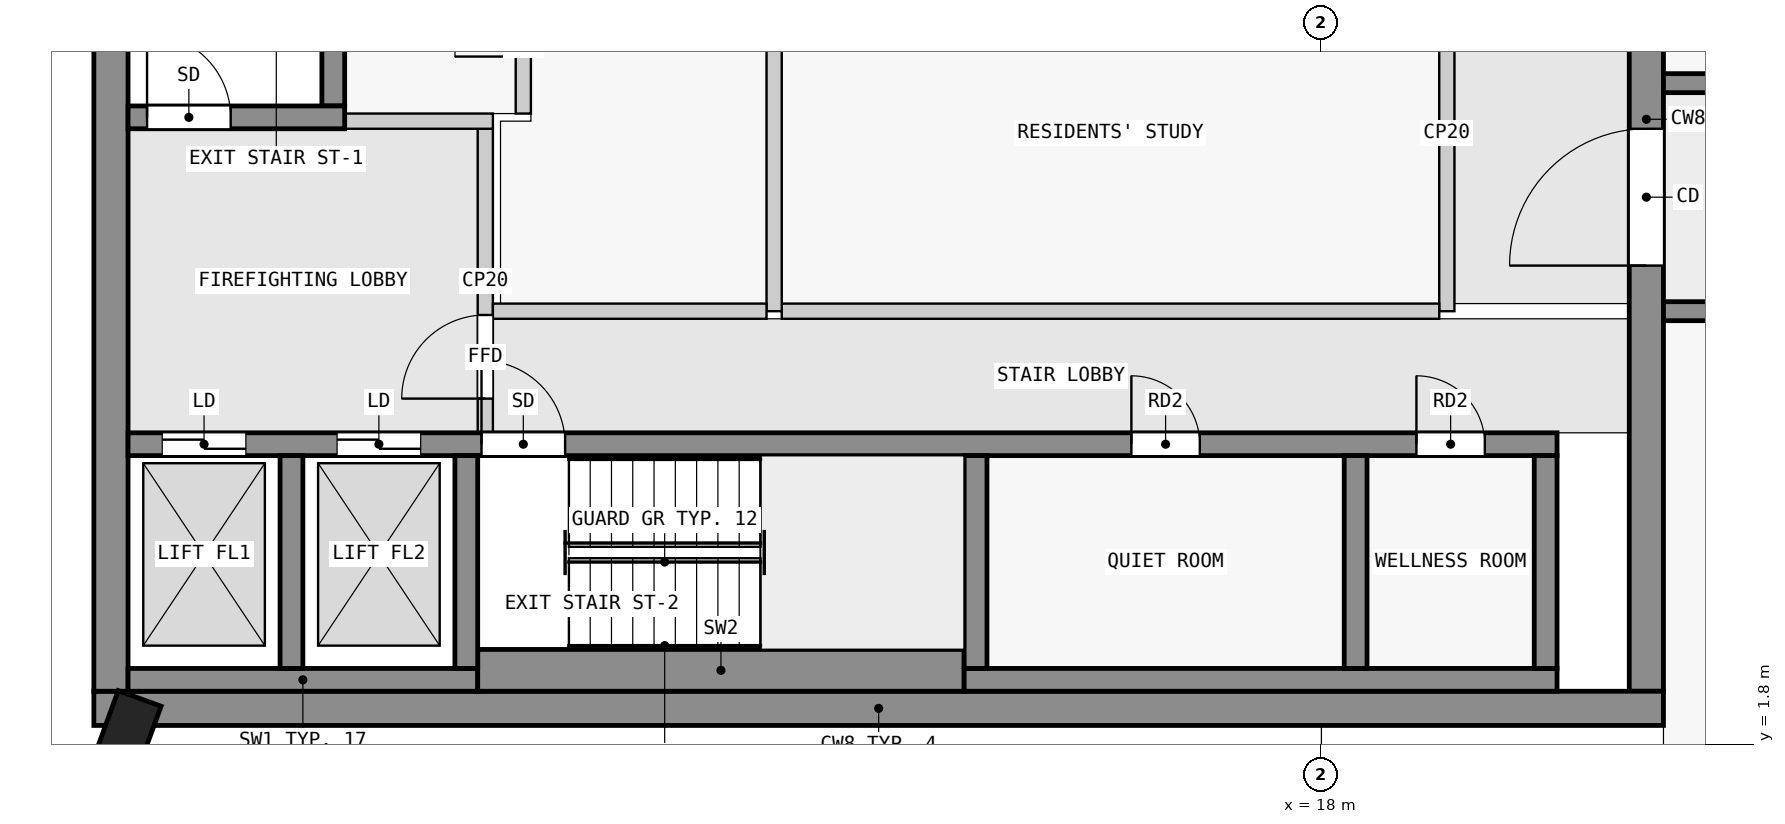
"""IFC4 building model, lengths in metres.
Left out: names, types, materials, properties, quantities, classifications, styles, units other than length and angle.
Written with IfcOpenShell. Run it as: python <this file> out.ifc"""

import sys

from ifc_helpers import new_model, si_unit, direction, frame, frame_2d, origin, origin_2d, place, context, subcontext, project, spatial, rectangle, extrude, element, fill, save


model = new_model("IFC4")
c1 = context("Model", 3, precision=1e-05, world=origin(), true_north=direction((0.0, 1.0)))
c2 = subcontext(c1, "Body", "Model", "MODEL_VIEW")
j1 = project(units=[si_unit("LENGTHUNIT", "METRE"), si_unit("PLANEANGLEUNIT", "RADIAN")], contexts=[c1])
p1 = place(None, origin())
s1 = spatial("IfcSite", under=j1, at=p1, CompositionType="ELEMENT")
p2 = place(p1, origin())
s2 = spatial("IfcBuilding", under=s1, at=p2, CompositionType="ELEMENT")
p3 = place(p2, frame((0.0, 0.0, 277.4)))
s3 = spatial("IfcBuildingStorey", under=s2, at=p3, CompositionType="ELEMENT", Elevation=277.4)
p4 = place(p3, frame((2.213, 1.748, 0.0), z_axis=(0.0, 0.0, 1.0), x_axis=(-0.939664280925, 0.342097996418, 0.0)))
e1 = element("IfcColumn", 1, at=p4, inside=s3, PredefinedType="COLUMN", context=c2, shape_type="SweptSolid", body=[
    extrude(rectangle(XDim=0.6, YDim=1.4, at=origin_2d()), origin(), (0.0, 0.0, 1.0), 3.5),
])
p5 = place(p3, frame((1.85, 2.275, 0.0), z_axis=(0.0, 0.0, 1.0), x_axis=(1.0, 0.0, 0.0)))
e2 = element("IfcWall", 2, at=p5, inside=s3, PredefinedType="SHEAR", context=c2, shape_type="SweptSolid", body=[
    extrude(rectangle(XDim=20.65, YDim=0.45, at=frame_2d((10.325, 0.0))), origin(), (0.0, 0.0, 1.0), 3.25),
])
p6 = place(p3, frame((2.075, 2.5, 0.0), z_axis=(0.0, 0.0, 1.0), x_axis=(0.0, 1.0, 0.0)))
e3 = element("IfcWall", 3, at=p6, inside=s3, PredefinedType="SHEAR", context=c2, shape_type="SweptSolid", body=[
    extrude(rectangle(XDim=15.05, YDim=0.45, at=frame_2d((7.525, 0.0))), origin(), (0.0, 0.0, 1.0), 3.25),
])
p7 = place(p3, frame((22.275, 2.5, 0.0), z_axis=(0.0, 0.0, 1.0), x_axis=(0.0, 1.0, 0.0)))
e4 = element("IfcWall", 4, at=p7, inside=s3, PredefinedType="SHEAR", context=c2, shape_type="SweptSolid", body=[
    extrude(rectangle(XDim=15.05, YDim=0.45, at=frame_2d((7.525, 0.0))), origin(), (0.0, 0.0, 1.0), 3.25),
])
p8 = place(p7, frame((5.6, 0.0, 0.0)))
e5 = element("IfcOpeningElement", 5, at=p8, cuts=e4, PredefinedType="OPENING", context=c2, shape_type="SweptSolid", body=[
    extrude(rectangle(XDim=1.8, YDim=2.1, at=frame_2d((0.9, 1.05))), frame((0.0, 0.235, 0.0), z_axis=(0.0, -1.0, 0.0), x_axis=(1.0, 0.0, 0.0)), (0.0, 0.0, 1.0), 0.47),
])
p9 = place(p3, frame((2.3, 2.65, 0.0), z_axis=(0.0, 0.0, 1.0), x_axis=(1.0, 0.0, 0.0)))
e6 = element("IfcWall", 6, at=p9, inside=s3, PredefinedType="SHEAR", context=c2, shape_type="SweptSolid", body=[
    extrude(rectangle(XDim=4.6, YDim=0.3, at=frame_2d((2.3, 0.0))), origin(), (0.0, 0.0, 1.0), 3.25),
])
p10 = place(p3, frame((6.9, 2.775, 0.0), z_axis=(0.0, 0.0, 1.0), x_axis=(1.0, 0.0, 0.0)))
e7 = element("IfcWall", 7, at=p10, inside=s3, PredefinedType="SHEAR", context=c2, shape_type="SweptSolid", body=[
    extrude(rectangle(XDim=6.4, YDim=0.55, at=frame_2d((3.2, 0.0))), origin(), (0.0, 0.0, 1.0), 3.25),
])
p11 = place(p3, frame((13.3, 2.65, 0.0), z_axis=(0.0, 0.0, 1.0), x_axis=(1.0, 0.0, 0.0)))
e8 = element("IfcWall", 8, at=p11, inside=s3, PredefinedType="SHEAR", context=c2, shape_type="SweptSolid", body=[
    extrude(rectangle(XDim=7.8, YDim=0.3, at=frame_2d((3.9, 0.0))), origin(), (0.0, 0.0, 1.0), 3.25),
])
for number, where, z_axis, x_axis in (
    (9, (4.45, 2.8, 0.0), (0.0, 0.0, 1.0), (0.0, 1.0, 0.0)),
    (10, (6.75, 2.8, 0.0), (0.0, 0.0, 1.0), (0.0, 1.0, 0.0)),
    (11, (13.45, 2.8, 0.0), (0.0, 0.0, 1.0), (0.0, 1.0, 0.0)),
    (12, (18.45, 2.8, 0.0), (0.0, 0.0, 1.0), (0.0, 1.0, 0.0)),
    (13, (20.95, 2.8, 0.0), (0.0, 0.0, 1.0), (0.0, 1.0, 0.0)),
):
    element("IfcWall", number, at=place(p3, frame(where, z_axis=z_axis, x_axis=x_axis)), inside=s3, PredefinedType="SHEAR", context=c2, shape_type="SweptSolid", body=[
        extrude(rectangle(XDim=2.8, YDim=0.3, at=frame_2d((1.4, 0.0))), origin(), (0.0, 0.0, 1.0), 3.25),
    ])
p12 = place(p3, frame((2.3, 5.75, 0.0), z_axis=(0.0, 0.0, 1.0), x_axis=(1.0, 0.0, 0.0)))
e14 = element("IfcWall", 14, at=p12, inside=s3, PredefinedType="SHEAR", context=c2, shape_type="SweptSolid", body=[
    extrude(rectangle(XDim=18.8, YDim=0.3, at=frame_2d((9.4, 0.0))), origin(), (0.0, 0.0, 1.0), 3.25),
])
p13 = place(p12, frame((4.65, 0.0, 0.0)))
e15 = element("IfcOpeningElement", 15, at=p13, cuts=e14, PredefinedType="OPENING", context=c2, shape_type="SweptSolid", body=[
    extrude(rectangle(XDim=1.1, YDim=2.1, at=frame_2d((0.55, 1.05))), frame((0.0, 0.16, 0.0), z_axis=(0.0, -1.0, 0.0), x_axis=(1.0, 0.0, 0.0)), (0.0, 0.0, 1.0), 0.32),
])
p14 = place(p12, frame((0.45, 0.0, 0.0)))
e16 = element("IfcOpeningElement", 16, at=p14, cuts=e14, PredefinedType="OPENING", context=c2, shape_type="SweptSolid", body=[
    extrude(rectangle(XDim=1.1, YDim=2.1, at=frame_2d((0.55, 1.05))), frame((0.0, 0.16, 0.0), z_axis=(0.0, -1.0, 0.0), x_axis=(1.0, 0.0, 0.0)), (0.0, 0.0, 1.0), 0.32),
])
p15 = place(p12, frame((2.75, 0.0, 0.0)))
e17 = element("IfcOpeningElement", 17, at=p15, cuts=e14, PredefinedType="OPENING", context=c2, shape_type="SweptSolid", body=[
    extrude(rectangle(XDim=1.1, YDim=2.1, at=frame_2d((0.55, 1.05))), frame((0.0, 0.16, 0.0), z_axis=(0.0, -1.0, 0.0), x_axis=(1.0, 0.0, 0.0)), (0.0, 0.0, 1.0), 0.32),
])
p16 = place(p12, frame((13.2, 0.0, 0.0)))
e18 = element("IfcOpeningElement", 18, at=p16, cuts=e14, PredefinedType="OPENING", context=c2, shape_type="SweptSolid", body=[
    extrude(rectangle(XDim=0.9, YDim=2.1, at=frame_2d((0.45, 1.05))), frame((0.0, 0.16, 0.0), z_axis=(0.0, -1.0, 0.0), x_axis=(1.0, 0.0, 0.0)), (0.0, 0.0, 1.0), 0.32),
])
p17 = place(p12, frame((16.95, 0.0, 0.0)))
e19 = element("IfcOpeningElement", 19, at=p17, cuts=e14, PredefinedType="OPENING", context=c2, shape_type="SweptSolid", body=[
    extrude(rectangle(XDim=0.9, YDim=2.1, at=frame_2d((0.45, 1.05))), frame((0.0, 0.16, 0.0), z_axis=(0.0, -1.0, 0.0), x_axis=(1.0, 0.0, 0.0)), (0.0, 0.0, 1.0), 0.32),
])
p18 = place(p3, frame((2.3, 10.05, 0.0), z_axis=(0.0, 0.0, 1.0), x_axis=(1.0, 0.0, 0.0)))
e20 = element("IfcWall", 20, at=p18, inside=s3, PredefinedType="SHEAR", context=c2, shape_type="SweptSolid", body=[
    extrude(rectangle(XDim=2.85, YDim=0.3, at=frame_2d((1.425, 0.0))), origin(), (0.0, 0.0, 1.0), 3.25),
])
p19 = place(p18, frame((0.25, 0.0, 0.0)))
e21 = element("IfcOpeningElement", 21, at=p19, cuts=e20, PredefinedType="OPENING", context=c2, shape_type="SweptSolid", body=[
    extrude(rectangle(XDim=1.1, YDim=2.1, at=frame_2d((0.55, 1.05))), frame((0.0, 0.16, 0.0), z_axis=(0.0, -1.0, 0.0), x_axis=(1.0, 0.0, 0.0)), (0.0, 0.0, 1.0), 0.32),
])
p20 = place(p3, frame((5.0, 10.2, 0.0), z_axis=(0.0, 0.0, 1.0), x_axis=(0.0, 1.0, 0.0)))
e22 = element("IfcWall", 22, at=p20, inside=s3, PredefinedType="SHEAR", context=c2, shape_type="SweptSolid", body=[
    extrude(rectangle(XDim=6.4, YDim=0.3, at=frame_2d((3.2, 0.0))), origin(), (0.0, 0.0, 1.0), 3.25),
])
p21 = place(p3, frame((22.5, 7.5, 0.0), z_axis=(0.0, 0.0, 1.0), x_axis=(1.0, 0.0, 0.0)))
e23 = element("IfcWall", 23, at=p21, inside=s3, PredefinedType="SHEAR", context=c2, shape_type="SweptSolid", body=[
    extrude(rectangle(XDim=22.5, YDim=0.25, at=frame_2d((11.25, 0.0))), origin(), (0.0, 0.0, 1.0), 3.25),
])
p22 = place(p21, frame((1.85, 0.0, 0.0)))
e24 = element("IfcOpeningElement", 24, at=p22, cuts=e23, PredefinedType="OPENING", context=c2, shape_type="SweptSolid", body=[
    extrude(rectangle(XDim=0.9, YDim=2.1, at=frame_2d((0.45, 1.05))), frame((0.0, 0.135, 0.0), z_axis=(0.0, -1.0, 0.0), x_axis=(1.0, 0.0, 0.0)), (0.0, 0.0, 1.0), 0.27),
])
p23 = place(p21, frame((6.25, 0.0, 0.0)))
e25 = element("IfcOpeningElement", 25, at=p23, cuts=e23, PredefinedType="OPENING", context=c2, shape_type="SweptSolid", body=[
    extrude(rectangle(XDim=1.0, YDim=2.1, at=frame_2d((0.5, 1.05))), frame((0.0, 0.135, 0.0), z_axis=(0.0, -1.0, 0.0), x_axis=(1.0, 0.0, 0.0)), (0.0, 0.0, 1.0), 0.27),
])
p24 = place(p21, frame((10.35, 0.0, 0.0)))
e26 = element("IfcOpeningElement", 26, at=p24, cuts=e23, PredefinedType="OPENING", context=c2, shape_type="SweptSolid", body=[
    extrude(rectangle(XDim=1.8, YDim=2.1, at=frame_2d((0.9, 1.05))), frame((0.0, 0.135, 0.0), z_axis=(0.0, -1.0, 0.0), x_axis=(1.0, 0.0, 0.0)), (0.0, 0.0, 1.0), 0.27),
])
p25 = place(p21, frame((16.85, 0.0, 0.0)))
e27 = element("IfcOpeningElement", 27, at=p25, cuts=e23, PredefinedType="OPENING", context=c2, shape_type="SweptSolid", body=[
    extrude(rectangle(XDim=1.0, YDim=2.1, at=frame_2d((0.5, 1.05))), frame((0.0, 0.135, 0.0), z_axis=(0.0, -1.0, 0.0), x_axis=(1.0, 0.0, 0.0)), (0.0, 0.0, 1.0), 0.27),
])
p26 = place(p3, frame((22.5, 10.5, 0.0), z_axis=(0.0, 0.0, 1.0), x_axis=(1.0, 0.0, 0.0)))
e28 = element("IfcWall", 28, at=p26, inside=s3, PredefinedType="SHEAR", context=c2, shape_type="SweptSolid", body=[
    extrude(rectangle(XDim=22.5, YDim=0.25, at=frame_2d((11.25, 0.0))), origin(), (0.0, 0.0, 1.0), 3.25),
])
p27 = place(p26, frame((1.85, 0.0, 0.0)))
e29 = element("IfcOpeningElement", 29, at=p27, cuts=e28, PredefinedType="OPENING", context=c2, shape_type="SweptSolid", body=[
    extrude(rectangle(XDim=0.9, YDim=2.1, at=frame_2d((0.45, 1.05))), frame((0.0, 0.135, 0.0), z_axis=(0.0, -1.0, 0.0), x_axis=(1.0, 0.0, 0.0)), (0.0, 0.0, 1.0), 0.27),
])
p28 = place(p26, frame((10.05, 0.0, 0.0)))
e30 = element("IfcOpeningElement", 30, at=p28, cuts=e28, PredefinedType="OPENING", context=c2, shape_type="SweptSolid", body=[
    extrude(rectangle(XDim=1.0, YDim=2.1, at=frame_2d((0.5, 1.05))), frame((0.0, 0.135, 0.0), z_axis=(0.0, -1.0, 0.0), x_axis=(1.0, 0.0, 0.0)), (0.0, 0.0, 1.0), 0.27),
])
p29 = place(p26, frame((18.75, 0.0, 0.0)))
e31 = element("IfcOpeningElement", 31, at=p29, cuts=e28, PredefinedType="OPENING", context=c2, shape_type="SweptSolid", body=[
    extrude(rectangle(XDim=0.9, YDim=2.1, at=frame_2d((0.45, 1.05))), frame((0.0, 0.135, 0.0), z_axis=(0.0, -1.0, 0.0), x_axis=(1.0, 0.0, 0.0)), (0.0, 0.0, 1.0), 0.27),
])
p30 = place(p26, frame((20.95, 0.0, 0.0)))
e32 = element("IfcOpeningElement", 32, at=p30, cuts=e28, PredefinedType="OPENING", context=c2, shape_type="SweptSolid", body=[
    extrude(rectangle(XDim=1.0, YDim=2.1, at=frame_2d((0.5, 1.05))), frame((0.0, 0.135, 0.0), z_axis=(0.0, -1.0, 0.0), x_axis=(1.0, 0.0, 0.0)), (0.0, 0.0, 1.0), 0.27),
])
p31 = place(p3, frame((7.0, 5.9, 0.0), z_axis=(0.0, 0.0, 1.0), x_axis=(0.0, 1.0, 0.0)))
e33 = element("IfcWall", 33, at=p31, inside=s3, PredefinedType="PARTITIONING", context=c2, shape_type="SweptSolid", body=[
    extrude(rectangle(XDim=4.0, YDim=0.2, at=frame_2d((2.0, 0.0))), origin(), (0.0, 0.0, 1.0), 3.25),
])
p32 = place(p31, frame((0.45, 0.0, 0.0)))
e34 = element("IfcOpeningElement", 34, at=p32, cuts=e33, PredefinedType="OPENING", context=c2, shape_type="SweptSolid", body=[
    extrude(rectangle(XDim=1.1, YDim=2.1, at=frame_2d((0.55, 1.05))), frame((0.0, 0.11, 0.0), z_axis=(0.0, -1.0, 0.0), x_axis=(1.0, 0.0, 0.0)), (0.0, 0.0, 1.0), 0.22),
])
p33 = place(p3, frame((5.15, 10.0, 0.0), z_axis=(0.0, 0.0, 1.0), x_axis=(1.0, 0.0, 0.0)))
e35 = element("IfcWall", 35, at=p33, inside=s3, PredefinedType="PARTITIONING", context=c2, shape_type="SweptSolid", body=[
    extrude(rectangle(XDim=1.95, YDim=0.2, at=frame_2d((0.975, 0.0))), origin(), (0.0, 0.0, 1.0), 3.25),
])
p34 = place(p3, frame((7.1, 7.5, 0.0), z_axis=(0.0, 0.0, 1.0), x_axis=(1.0, 0.0, 0.0)))
e36 = element("IfcWall", 36, at=p34, inside=s3, PredefinedType="PARTITIONING", context=c2, shape_type="SweptSolid", body=[
    extrude(rectangle(XDim=3.6, YDim=0.2, at=frame_2d((1.8, 0.0))), origin(), (0.0, 0.0, 1.0), 3.25),
])
p35 = place(p3, frame((10.8, 7.5, 0.0), z_axis=(0.0, 0.0, 1.0), x_axis=(0.0, 1.0, 0.0)))
e37 = element("IfcWall", 37, at=p35, inside=s3, PredefinedType="PARTITIONING", context=c2, shape_type="SweptSolid", body=[
    extrude(rectangle(XDim=4.7, YDim=0.2, at=frame_2d((2.35, 0.0))), origin(), (0.0, 0.0, 1.0), 3.25),
])
p36 = place(p3, frame((10.9, 7.5, 0.0), z_axis=(0.0, 0.0, 1.0), x_axis=(1.0, 0.0, 0.0)))
e38 = element("IfcWall", 38, at=p36, inside=s3, PredefinedType="PARTITIONING", context=c2, shape_type="SweptSolid", body=[
    extrude(rectangle(XDim=8.65, YDim=0.2, at=frame_2d((4.325, 0.0))), origin(), (0.0, 0.0, 1.0), 3.25),
])
p37 = place(p3, frame((19.65, 7.5, 0.0), z_axis=(0.0, 0.0, 1.0), x_axis=(0.0, 1.0, 0.0)))
e39 = element("IfcWall", 39, at=p37, inside=s3, PredefinedType="PARTITIONING", context=c2, shape_type="SweptSolid", body=[
    extrude(rectangle(XDim=4.7, YDim=0.2, at=frame_2d((2.35, 0.0))), origin(), (0.0, 0.0, 1.0), 3.25),
])
p38 = place(p3, frame((7.5, 10.1, 0.0), z_axis=(0.0, 0.0, 1.0), x_axis=(0.0, 1.0, 0.0)))
e40 = element("IfcWall", 40, at=p38, inside=s3, PredefinedType="PARTITIONING", context=c2, shape_type="SweptSolid", body=[
    extrude(rectangle(XDim=7.45, YDim=0.2, at=frame_2d((3.725, 0.0))), origin(), (0.0, 0.0, 1.0), 3.25),
])
p39 = place(p38, frame((0.75, 0.0, 0.0)))
e41 = element("IfcOpeningElement", 41, at=p39, cuts=e40, PredefinedType="OPENING", context=c2, shape_type="SweptSolid", body=[
    extrude(rectangle(XDim=0.9, YDim=2.1, at=frame_2d((0.45, 1.05))), frame((0.0, 0.11, 0.0), z_axis=(0.0, -1.0, 0.0), x_axis=(1.0, 0.0, 0.0)), (0.0, 0.0, 1.0), 0.22),
])
p40 = place(p38, frame((4.475, 0.0, 0.0)))
e42 = element("IfcOpeningElement", 42, at=p40, cuts=e40, PredefinedType="OPENING", context=c2, shape_type="SweptSolid", body=[
    extrude(rectangle(XDim=0.9, YDim=2.1, at=frame_2d((0.45, 1.05))), frame((0.0, 0.11, 0.0), z_axis=(0.0, -1.0, 0.0), x_axis=(1.0, 0.0, 0.0)), (0.0, 0.0, 1.0), 0.22),
])
p41 = place(p32, origin())
e43 = element("IfcDoor", 43, at=p41, inside=s3, OperationType="SINGLE_SWING_LEFT", PredefinedType="DOOR", context=c2, shape_type="SweptSolid", body=[
    extrude(rectangle(XDim=1.1, YDim=2.1, at=frame_2d((0.55, 1.05))), frame((0.0, 0.025, 0.0), z_axis=(0.0, -1.0, 0.0), x_axis=(1.0, 0.0, 0.0)), (0.0, 0.0, 1.0), 0.05),
])
fill(e34, e43)
p42 = place(p19, origin())
e44 = element("IfcDoor", 44, at=p42, inside=s3, OperationType="SINGLE_SWING_RIGHT", PredefinedType="DOOR", context=c2, shape_type="SweptSolid", body=[
    extrude(rectangle(XDim=1.1, YDim=2.1, at=frame_2d((0.55, 1.05))), frame((0.0, 0.025, 0.0), z_axis=(0.0, -1.0, 0.0), x_axis=(1.0, 0.0, 0.0)), (0.0, 0.0, 1.0), 0.05),
])
fill(e21, e44)
p43 = place(p13, origin())
e45 = element("IfcDoor", 45, at=p43, inside=s3, OperationType="SINGLE_SWING_LEFT", PredefinedType="DOOR", context=c2, shape_type="SweptSolid", body=[
    extrude(rectangle(XDim=1.1, YDim=2.1, at=frame_2d((0.55, 1.05))), frame((0.0, 0.025, 0.0), z_axis=(0.0, -1.0, 0.0), x_axis=(1.0, 0.0, 0.0)), (0.0, 0.0, 1.0), 0.05),
])
fill(e15, e45)
p44 = place(p14, origin())
e46 = element("IfcDoor", 46, at=p44, inside=s3, OperationType="DOUBLE_DOOR_SLIDING", PredefinedType="DOOR", context=c2, shape_type="SweptSolid", body=[
    extrude(rectangle(XDim=1.1, YDim=2.1, at=frame_2d((0.55, 1.05))), frame((0.0, 0.025, 0.0), z_axis=(0.0, -1.0, 0.0), x_axis=(1.0, 0.0, 0.0)), (0.0, 0.0, 1.0), 0.05),
])
fill(e16, e46)
p45 = place(p15, origin())
e47 = element("IfcDoor", 47, at=p45, inside=s3, OperationType="DOUBLE_DOOR_SLIDING", PredefinedType="DOOR", context=c2, shape_type="SweptSolid", body=[
    extrude(rectangle(XDim=1.1, YDim=2.1, at=frame_2d((0.55, 1.05))), frame((0.0, 0.025, 0.0), z_axis=(0.0, -1.0, 0.0), x_axis=(1.0, 0.0, 0.0)), (0.0, 0.0, 1.0), 0.05),
])
fill(e17, e47)
p46 = place(p8, origin())
e48 = element("IfcDoor", 48, at=p46, inside=s3, OperationType="DOUBLE_DOOR_SINGLE_SWING", PredefinedType="DOOR", context=c2, shape_type="SweptSolid", body=[
    extrude(rectangle(XDim=1.8, YDim=2.1, at=frame_2d((0.9, 1.05))), frame((0.0, 0.025, 0.0), z_axis=(0.0, -1.0, 0.0), x_axis=(1.0, 0.0, 0.0)), (0.0, 0.0, 1.0), 0.05),
])
fill(e5, e48)
p47 = place(p39, origin())
e49 = element("IfcDoor", 49, at=p47, inside=s3, OperationType="SINGLE_SWING_RIGHT", PredefinedType="DOOR", context=c2, shape_type="SweptSolid", body=[
    extrude(rectangle(XDim=0.9, YDim=2.1, at=frame_2d((0.45, 1.05))), frame((0.0, 0.025, 0.0), z_axis=(0.0, -1.0, 0.0), x_axis=(1.0, 0.0, 0.0)), (0.0, 0.0, 1.0), 0.05),
])
fill(e41, e49)
p48 = place(p16, origin())
e50 = element("IfcDoor", 50, at=p48, inside=s3, OperationType="SINGLE_SWING_LEFT", PredefinedType="DOOR", context=c2, shape_type="SweptSolid", body=[
    extrude(rectangle(XDim=0.9, YDim=2.1, at=frame_2d((0.45, 1.05))), frame((0.0, 0.025, 0.0), z_axis=(0.0, -1.0, 0.0), x_axis=(1.0, 0.0, 0.0)), (0.0, 0.0, 1.0), 0.05),
])
fill(e18, e50)
p49 = place(p17, origin())
e51 = element("IfcDoor", 51, at=p49, inside=s3, OperationType="SINGLE_SWING_LEFT", PredefinedType="DOOR", context=c2, shape_type="SweptSolid", body=[
    extrude(rectangle(XDim=0.9, YDim=2.1, at=frame_2d((0.45, 1.05))), frame((0.0, 0.025, 0.0), z_axis=(0.0, -1.0, 0.0), x_axis=(1.0, 0.0, 0.0)), (0.0, 0.0, 1.0), 0.05),
])
fill(e19, e51)
save(model, sys.argv[1])
